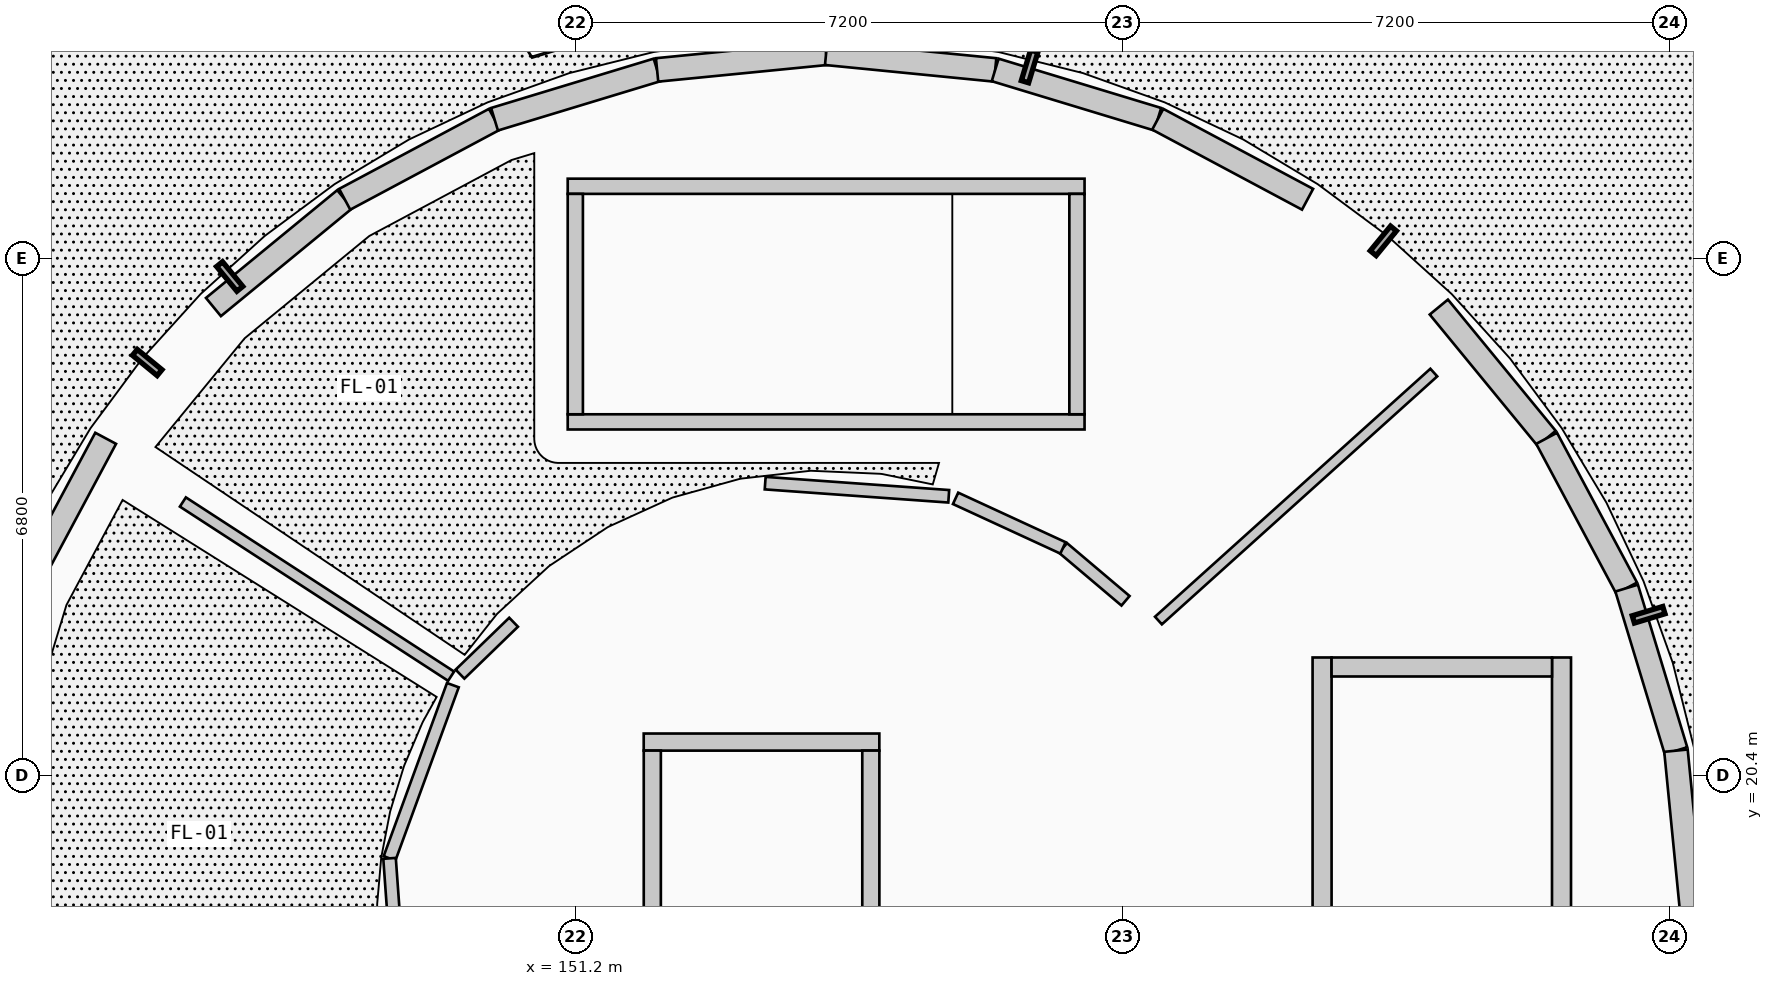
"""IFC4 building model, lengths in metres.
Left out: names, types, materials, properties, quantities, classifications, styles, units other than length and angle.
Written with IfcOpenShell. Run it as: python <this file> out.ifc"""

import sys

from ifc_helpers import new_model, si_unit, direction, frame, frame_2d, origin, origin_2d, place, context, subcontext, project, spatial, rectangle, circle, extrude, element, fill, save


model = new_model("IFC4")
c1 = context("Model", 3, precision=1e-05, world=origin(), true_north=direction((0.0, 1.0)))
c2 = subcontext(c1, "Body", "Model", "MODEL_VIEW")
j1 = project(units=[si_unit("LENGTHUNIT", "METRE"), si_unit("PLANEANGLEUNIT", "RADIAN")], contexts=[c1])
p1 = place(None, origin())
s1 = spatial("IfcSite", under=j1, at=p1, CompositionType="ELEMENT")
p2 = place(p1, origin())
s2 = spatial("IfcBuilding", under=s1, at=p2, CompositionType="ELEMENT")
p3 = place(p2, origin())
s3 = spatial("IfcBuildingStorey", under=s2, at=p3, CompositionType="ELEMENT", Elevation=0.0)
for number, where, z_axis, x_axis in (
    (1, (165.38, 18.5, 0.0), (0.0, 0.0, 1.0), (1.0, 0.0, 0.0)),
    (2, (164.552, 22.664, 0.0), (0.0, 0.0, 1.0), (1.0, 0.0, 0.0)),
    (3, (162.193, 26.193, 0.0), (0.0, 0.0, 1.0), (1.0, 0.0, 0.0)),
    (4, (158.664, 28.552, 0.0), (0.0, 0.0, 1.0), (1.0, 0.0, 0.0)),
    (5, (154.5, 29.38, 0.0), (0.0, 0.0, 1.0), (1.0, 0.0, 0.0)),
    (6, (150.336, 28.552, 0.0), (0.0, 0.0, 1.0), (1.0, 0.0, 0.0)),
    (7, (146.807, 26.193, 0.0), (0.0, 0.0, 1.0), (1.0, 0.0, 0.0)),
    (8, (144.448, 22.664, 0.0), (0.0, 0.0, 1.0), (1.0, 0.0, 0.0)),
):
    element("IfcColumn", number, at=place(p3, frame(where, z_axis=z_axis, x_axis=x_axis)), inside=s3, PredefinedType="PILASTER", context=c2, shape_type="SweptSolid", body=[
        extrude(circle(Radius=0.275, at=origin_2d()), origin(), (0.0, 0.0, 1.0), 4.55),
    ])
for number, where, z_axis, x_axis in (
    (9, (158.601, 22.601, 0.0), (0.0, 0.0, 1.0), (1.0, 0.0, 0.0)),
    (10, (150.399, 22.601, 0.0), (0.0, 0.0, 1.0), (1.0, 0.0, 0.0)),
    (11, (148.7, 18.5, 0.0), (0.0, 0.0, 1.0), (1.0, 0.0, 0.0)),
):
    element("IfcColumn", number, at=place(p3, frame(where, z_axis=z_axis, x_axis=x_axis)), inside=s3, PredefinedType="COLUMN", context=c2, shape_type="SweptSolid", body=[
        extrude(rectangle(XDim=0.365, YDim=0.365, at=origin_2d()), origin(), (0.0, 0.0, 1.0), 4.55),
    ])
p4 = place(p3, frame((151.056, 29.544, 0.0), z_axis=(0.0, 0.0, 1.0), x_axis=(1.0, 0.0, 0.0)))
e12 = element("IfcColumn", 12, at=p4, inside=s3, PredefinedType="PILASTER", context=c2, shape_type="SweptSolid", body=[
    extrude(circle(Radius=0.275, at=origin_2d()), origin(), (0.0, 0.0, 1.0), 4.55),
])
p5 = place(p3, frame((143.968, 22.863, 0.0), z_axis=(0.0, 0.0, 1.0), x_axis=(0.471217561446, 0.882017012185, 0.0)))
e13 = element("IfcWall", 13, at=p5, inside=s3, PredefinedType="SOLIDWALL", context=c2, shape_type="SweptSolid", body=[
    extrude(rectangle(XDim=2.235, YDim=0.31, at=frame_2d((1.117, 0.0))), origin(), (0.0, 0.0, 1.0), 3.659),
])
p6 = place(p5, frame((0.417, 0.0, 0.0)))
e14 = element("IfcOpeningElement", 14, at=p6, cuts=e13, PredefinedType="OPENING", context=c2, shape_type="SweptSolid", body=[
    extrude(rectangle(XDim=1.4, YDim=2.3, at=frame_2d((0.7, 1.15))), frame((0.0, 0.165, 0.0), z_axis=(0.0, -1.0, 0.0), x_axis=(1.0, 0.0, 0.0)), (0.0, 0.0, 1.0), 0.33),
])
for number, where, z_axis, x_axis in (
    (15, (146.439, 26.561, 0.0), (0.0, 0.0, 1.0), (0.773, 0.635, 0.0)),
    (16, (148.166, 27.979, 0.0), (0.0, 0.0, 1.0), (0.882, 0.471, 0.0)),
):
    element("IfcWall", number, at=place(p3, frame(where, z_axis=z_axis, x_axis=x_axis)), inside=s3, PredefinedType="SOLIDWALL", context=c2, shape_type="SweptSolid", body=[
        extrude(rectangle(XDim=2.235, YDim=0.31, at=frame_2d((1.117, 0.0))), origin(), (0.0, 0.0, 1.0), 3.659),
    ])
p7 = place(p3, frame((150.137, 29.032, 0.0), z_axis=(0.0, 0.0, 1.0), x_axis=(0.956928814218, 0.290322655883, 0.0)))
e17 = element("IfcWall", 17, at=p7, inside=s3, PredefinedType="SOLIDWALL", context=c2, shape_type="SweptSolid", body=[
    extrude(rectangle(XDim=2.235, YDim=0.31, at=frame_2d((1.118, 0.0))), origin(), (0.0, 0.0, 1.0), 3.659),
])
for number, where, z_axis, x_axis in (
    (18, (152.276, 29.681, 0.0), (0.0, 0.0, 1.0), (0.995, 0.098, 0.0)),
    (19, (154.5, 29.9, 0.0), (0.0, 0.0, 1.0), (0.995, -0.098, 0.0)),
):
    element("IfcWall", number, at=place(p3, frame(where, z_axis=z_axis, x_axis=x_axis)), inside=s3, PredefinedType="SOLIDWALL", context=c2, shape_type="SweptSolid", body=[
        extrude(rectangle(XDim=2.235, YDim=0.31, at=frame_2d((1.117, 0.0))), origin(), (0.0, 0.0, 1.0), 3.659),
    ])
p8 = place(p3, frame((156.724, 29.681, 0.0), z_axis=(0.0, 0.0, 1.0), x_axis=(0.956928814218, -0.290322655883, 0.0)))
e20 = element("IfcWall", 20, at=p8, inside=s3, PredefinedType="SOLIDWALL", context=c2, shape_type="SweptSolid", body=[
    extrude(rectangle(XDim=2.235, YDim=0.31, at=frame_2d((1.118, 0.0))), origin(), (0.0, 0.0, 1.0), 3.659),
])
p9 = place(p3, frame((158.863, 29.032, 0.0), z_axis=(0.0, 0.0, 1.0), x_axis=(0.882017012185, -0.471217561446, 0.0)))
e21 = element("IfcWall", 21, at=p9, inside=s3, PredefinedType="SOLIDWALL", context=c2, shape_type="SweptSolid", body=[
    extrude(rectangle(XDim=2.235, YDim=0.31, at=frame_2d((1.117, 0.0))), origin(), (0.0, 0.0, 1.0), 3.659),
])
p10 = place(p9, frame((0.467, 0.0, 0.0)))
e22 = element("IfcOpeningElement", 22, at=p10, cuts=e21, PredefinedType="OPENING", context=c2, shape_type="SweptSolid", body=[
    extrude(rectangle(XDim=1.3, YDim=2.25, at=frame_2d((0.65, 1.125))), frame((0.0, 0.165, 0.0), z_axis=(0.0, -1.0, 0.0), x_axis=(1.0, 0.0, 0.0)), (0.0, 0.0, 1.0), 0.33),
])
for number, where, z_axis, x_axis in (
    (23, (162.561, 26.561, 0.0), (0.0, 0.0, 1.0), (0.635, -0.773, 0.0)),
    (24, (163.979, 24.834, 0.0), (0.0, 0.0, 1.0), (0.471, -0.882, 0.0)),
):
    element("IfcWall", number, at=place(p3, frame(where, z_axis=z_axis, x_axis=x_axis)), inside=s3, PredefinedType="SOLIDWALL", context=c2, shape_type="SweptSolid", body=[
        extrude(rectangle(XDim=2.235, YDim=0.31, at=frame_2d((1.117, 0.0))), origin(), (0.0, 0.0, 1.0), 3.659),
    ])
p11 = place(p3, frame((165.032, 22.863, 0.0), z_axis=(0.0, 0.0, 1.0), x_axis=(0.290322655883, -0.956928814218, 0.0)))
e25 = element("IfcWall", 25, at=p11, inside=s3, PredefinedType="SOLIDWALL", context=c2, shape_type="SweptSolid", body=[
    extrude(rectangle(XDim=2.235, YDim=0.31, at=frame_2d((1.118, 0.0))), origin(), (0.0, 0.0, 1.0), 3.659),
])
p12 = place(p3, frame((165.681, 20.724, 0.0), z_axis=(0.0, 0.0, 1.0), x_axis=(0.097989369151, -0.995187461503, 0.0)))
e26 = element("IfcWall", 26, at=p12, inside=s3, PredefinedType="SOLIDWALL", context=c2, shape_type="SweptSolid", body=[
    extrude(rectangle(XDim=2.235, YDim=0.31, at=frame_2d((1.117, 0.0))), origin(), (0.0, 0.0, 1.0), 3.659),
])
p13 = place(p3, frame((161.025, 21.95, 0.0), z_axis=(0.0, 0.0, 1.0), x_axis=(0.0, -1.0, 0.0)))
e27 = element("IfcWall", 27, at=p13, inside=s3, PredefinedType="SHEAR", context=c2, shape_type="SweptSolid", body=[
    extrude(rectangle(XDim=6.9, YDim=0.25, at=frame_2d((3.45, 0.0))), origin(), (0.0, 0.0, 1.0), 4.305),
])
p14 = place(p13, frame((0.43, 0.0, 0.0)))
e28 = element("IfcOpeningElement", 28, at=p14, cuts=e27, PredefinedType="OPENING", context=c2, shape_type="SweptSolid", body=[
    extrude(rectangle(XDim=1.1, YDim=2.15, at=frame_2d((0.55, 1.075))), frame((0.0, 0.135, 0.0), z_axis=(0.0, -1.0, 0.0), x_axis=(1.0, 0.0, 0.0)), (0.0, 0.0, 1.0), 0.27),
])
p15 = place(p3, frame((164.175, 21.95, 0.0), z_axis=(0.0, 0.0, 1.0), x_axis=(0.0, -1.0, 0.0)))
e29 = element("IfcWall", 29, at=p15, inside=s3, PredefinedType="SHEAR", context=c2, shape_type="SweptSolid", body=[
    extrude(rectangle(XDim=6.9, YDim=0.25, at=frame_2d((3.45, 0.0))), origin(), (0.0, 0.0, 1.0), 4.305),
])
p16 = place(p3, frame((161.15, 21.825, 0.0), z_axis=(0.0, 0.0, 1.0), x_axis=(1.0, 0.0, 0.0)))
e30 = element("IfcWall", 30, at=p16, inside=s3, PredefinedType="SHEAR", context=c2, shape_type="SweptSolid", body=[
    extrude(rectangle(XDim=2.9, YDim=0.25, at=frame_2d((1.45, 0.0))), origin(), (0.0, 0.0, 1.0), 4.305),
])
p17 = place(p3, frame((151.1, 25.05, 0.0), z_axis=(0.0, 0.0, 1.0), x_axis=(1.0, 0.0, 0.0)))
e31 = element("IfcWall", 31, at=p17, inside=s3, PredefinedType="SHEAR", context=c2, shape_type="SweptSolid", body=[
    extrude(rectangle(XDim=6.8, YDim=0.2, at=frame_2d((3.4, 0.0))), origin(), (0.0, 0.0, 1.0), 4.305),
])
p18 = place(p17, frame((0.38, 0.0, 0.0)))
e32 = element("IfcOpeningElement", 32, at=p18, cuts=e31, PredefinedType="OPENING", context=c2, shape_type="SweptSolid", body=[
    extrude(rectangle(XDim=1.05, YDim=2.15, at=frame_2d((0.525, 1.075))), frame((0.0, 0.11, 0.0), z_axis=(0.0, -1.0, 0.0), x_axis=(1.0, 0.0, 0.0)), (0.0, 0.0, 1.0), 0.22),
])
p19 = place(p3, frame((151.1, 28.15, 0.0), z_axis=(0.0, 0.0, 1.0), x_axis=(1.0, 0.0, 0.0)))
e33 = element("IfcWall", 33, at=p19, inside=s3, PredefinedType="SHEAR", context=c2, shape_type="SweptSolid", body=[
    extrude(rectangle(XDim=6.8, YDim=0.2, at=frame_2d((3.4, 0.0))), origin(), (0.0, 0.0, 1.0), 4.305),
])
for number, where, z_axis, x_axis in (
    (34, (151.2, 25.15, 0.0), (0.0, 0.0, 1.0), (0.0, 1.0, 0.0)),
    (35, (157.8, 25.15, 0.0), (0.0, 0.0, 1.0), (0.0, 1.0, 0.0)),
):
    element("IfcWall", number, at=place(p3, frame(where, z_axis=z_axis, x_axis=x_axis)), inside=s3, PredefinedType="SHEAR", context=c2, shape_type="SweptSolid", body=[
        extrude(rectangle(XDim=2.9, YDim=0.2, at=frame_2d((1.45, 0.0))), origin(), (0.0, 0.0, 1.0), 4.305),
    ])
p20 = place(p3, frame((152.1, 20.837, 0.0), z_axis=(0.0, 0.0, 1.0), x_axis=(1.0, 0.0, 0.0)))
e36 = element("IfcWall", 36, at=p20, inside=s3, PredefinedType="SHEAR", context=c2, shape_type="SweptSolid", body=[
    extrude(rectangle(XDim=3.1, YDim=0.225, at=frame_2d((1.55, 0.0))), origin(), (0.0, 0.0, 1.0), 4.305),
])
for number, where, z_axis, x_axis in (
    (37, (152.213, 18.575, 0.0), (0.0, 0.0, 1.0), (0.0, 1.0, 0.0)),
    (38, (155.088, 18.575, 0.0), (0.0, 0.0, 1.0), (0.0, 1.0, 0.0)),
):
    element("IfcWall", number, at=place(p3, frame(where, z_axis=z_axis, x_axis=x_axis)), inside=s3, PredefinedType="SHEAR", context=c2, shape_type="SweptSolid", body=[
        extrude(rectangle(XDim=2.15, YDim=0.225, at=frame_2d((1.075, 0.0))), origin(), (0.0, 0.0, 1.0), 4.305),
    ])
p21 = place(p3, frame((149.566, 21.704, 0.0), z_axis=(0.0, 0.0, 1.0), x_axis=(-0.838631802298, 0.544698724227, 0.0)))
e39 = element("IfcWall", 39, at=p21, inside=s3, PredefinedType="PARTITIONING", context=c2, shape_type="SweptSolid", body=[
    extrude(rectangle(XDim=4.208, YDim=0.145, at=frame_2d((2.104, 0.0))), origin(), (0.0, 0.0, 1.0), 3.634),
])
p22 = place(p3, frame((158.872, 22.436, 0.0), z_axis=(0.0, 0.0, 1.0), x_axis=(0.743070024966, 0.669213671406, 0.0)))
e40 = element("IfcWall", 40, at=p22, inside=s3, PredefinedType="PLUMBINGWALL", context=c2, shape_type="SweptSolid", body=[
    extrude(rectangle(XDim=4.876, YDim=0.135, at=frame_2d((2.438, 0.0))), origin(), (0.0, 0.0, 1.0), 3.634),
])
p23 = place(p3, frame((156.113, 24.071, 0.0), z_axis=(0.0, 0.0, 1.0), x_axis=(-0.997448452595, 0.071390366401, 0.0)))
e41 = element("IfcWall", 41, at=p23, inside=s3, PredefinedType="PARTITIONING", context=c2, shape_type="SweptSolid", body=[
    extrude(rectangle(XDim=2.421, YDim=0.165, at=frame_2d((1.21, 0.0))), origin(), (0.0, 0.0, 1.0), 3.634),
])
p24 = place(p3, frame((150.388, 22.414, 0.0), z_axis=(0.0, 0.0, 1.0), x_axis=(-0.718088711181, -0.69595158084, 0.0)))
e42 = element("IfcWall", 42, at=p24, inside=s3, PredefinedType="PARTITIONING", context=c2, shape_type="SweptSolid", body=[
    extrude(rectangle(XDim=0.981, YDim=0.165, at=frame_2d((0.491, 0.0))), origin(), (0.0, 0.0, 1.0), 3.634),
])
p25 = place(p3, frame((149.589, 21.586, 0.0), z_axis=(0.0, 0.0, 1.0), x_axis=(-0.343293663048, -0.93922811974, 0.0)))
e43 = element("IfcWall", 43, at=p25, inside=s3, PredefinedType="PARTITIONING", context=c2, shape_type="SweptSolid", body=[
    extrude(rectangle(XDim=2.427, YDim=0.165, at=frame_2d((1.213, 0.0))), origin(), (0.0, 0.0, 1.0), 3.634),
])
p26 = place(p25, frame((0.703, 0.0, 0.0)))
e44 = element("IfcOpeningElement", 44, at=p26, cuts=e43, PredefinedType="OPENING", context=c2, shape_type="SweptSolid", body=[
    extrude(rectangle(XDim=1.02, YDim=2.2, at=frame_2d((0.51, 1.1))), frame((0.0, 0.093, 0.0), z_axis=(0.0, -1.0, 0.0), x_axis=(1.0, 0.0, 0.0)), (0.0, 0.0, 1.0), 0.185),
])
p27 = place(p3, frame((148.756, 19.307, 0.0), z_axis=(0.0, 0.0, 1.0), x_axis=(0.071939342489, -0.997409008884, 0.0)))
e45 = element("IfcWall", 45, at=p27, inside=s3, PredefinedType="PARTITIONING", context=c2, shape_type="SweptSolid", body=[
    extrude(rectangle(XDim=0.652, YDim=0.165, at=frame_2d((0.326, 0.0))), origin(), (0.0, 0.0, 1.0), 3.634),
])
p28 = place(p3, frame((158.439, 22.696, 0.0), z_axis=(0.0, 0.0, 1.0), x_axis=(-0.763540910225, 0.645759458633, 0.0)))
e46 = element("IfcWall", 46, at=p28, inside=s3, PredefinedType="PARTITIONING", context=c2, shape_type="SweptSolid", body=[
    extrude(rectangle(XDim=1.078, YDim=0.165, at=frame_2d((0.539, 0.0))), origin(), (0.0, 0.0, 1.0), 3.634),
])
p29 = place(p3, frame((157.616, 23.392, 0.0), z_axis=(0.0, 0.0, 1.0), x_axis=(-0.908042017689, 0.418879092472, 0.0)))
e47 = element("IfcWall", 47, at=p29, inside=s3, PredefinedType="PARTITIONING", context=c2, shape_type="SweptSolid", body=[
    extrude(rectangle(XDim=1.556, YDim=0.165, at=frame_2d((0.778, 0.0))), origin(), (0.0, 0.0, 1.0), 3.634),
])
p30 = place(p29, frame((0.328, 0.0, 0.0)))
e48 = element("IfcOpeningElement", 48, at=p30, cuts=e47, PredefinedType="OPENING", context=c2, shape_type="SweptSolid", body=[
    extrude(rectangle(XDim=0.9, YDim=2.1, at=frame_2d((0.45, 1.05))), frame((0.0, 0.093, 0.0), z_axis=(0.0, -1.0, 0.0), x_axis=(1.0, 0.0, 0.0)), (0.0, 0.0, 1.0), 0.185),
])
p31 = place(p6, origin())
e49 = element("IfcDoor", 49, at=p31, inside=s3, OperationType="SINGLE_SWING_LEFT", PredefinedType="DOOR", context=c2, shape_type="SweptSolid", body=[
    extrude(rectangle(XDim=1.4, YDim=2.3, at=frame_2d((0.7, 1.15))), frame((0.0, 0.025, 0.0), z_axis=(0.0, -1.0, 0.0), x_axis=(1.0, 0.0, 0.0)), (0.0, 0.0, 1.0), 0.05),
])
fill(e14, e49)
p32 = place(p10, origin())
e50 = element("IfcDoor", 50, at=p32, inside=s3, OperationType="SINGLE_SWING_RIGHT", PredefinedType="DOOR", context=c2, shape_type="SweptSolid", body=[
    extrude(rectangle(XDim=1.3, YDim=2.25, at=frame_2d((0.65, 1.125))), frame((0.0, 0.025, 0.0), z_axis=(0.0, -1.0, 0.0), x_axis=(1.0, 0.0, 0.0)), (0.0, 0.0, 1.0), 0.05),
])
fill(e22, e50)
p33 = place(p14, origin())
e51 = element("IfcDoor", 51, at=p33, inside=s3, OperationType="SINGLE_SWING_RIGHT", PredefinedType="DOOR", context=c2, shape_type="SweptSolid", body=[
    extrude(rectangle(XDim=1.1, YDim=2.15, at=frame_2d((0.55, 1.075))), frame((0.0, 0.025, 0.0), z_axis=(0.0, -1.0, 0.0), x_axis=(1.0, 0.0, 0.0)), (0.0, 0.0, 1.0), 0.05),
])
fill(e28, e51)
p34 = place(p18, origin())
e52 = element("IfcDoor", 52, at=p34, inside=s3, OperationType="SINGLE_SWING_RIGHT", PredefinedType="DOOR", context=c2, shape_type="SweptSolid", body=[
    extrude(rectangle(XDim=1.05, YDim=2.15, at=frame_2d((0.525, 1.075))), frame((0.0, 0.025, 0.0), z_axis=(0.0, -1.0, 0.0), x_axis=(1.0, 0.0, 0.0)), (0.0, 0.0, 1.0), 0.05),
])
fill(e32, e52)
p35 = place(p26, origin())
e53 = element("IfcDoor", 53, at=p35, inside=s3, OperationType="SINGLE_SWING_LEFT", PredefinedType="DOOR", context=c2, shape_type="SweptSolid", body=[
    extrude(rectangle(XDim=1.02, YDim=2.2, at=frame_2d((0.51, 1.1))), frame((0.0, 0.025, 0.0), z_axis=(0.0, -1.0, 0.0), x_axis=(1.0, 0.0, 0.0)), (0.0, 0.0, 1.0), 0.05),
])
fill(e44, e53)
p36 = place(p30, origin())
e54 = element("IfcDoor", 54, at=p36, inside=s3, OperationType="SINGLE_SWING_LEFT", PredefinedType="DOOR", context=c2, shape_type="SweptSolid", body=[
    extrude(rectangle(XDim=0.9, YDim=2.1, at=frame_2d((0.45, 1.05))), frame((0.0, 0.025, 0.0), z_axis=(0.0, -1.0, 0.0), x_axis=(1.0, 0.0, 0.0)), (0.0, 0.0, 1.0), 0.05),
])
fill(e48, e54)
save(model, sys.argv[1])
